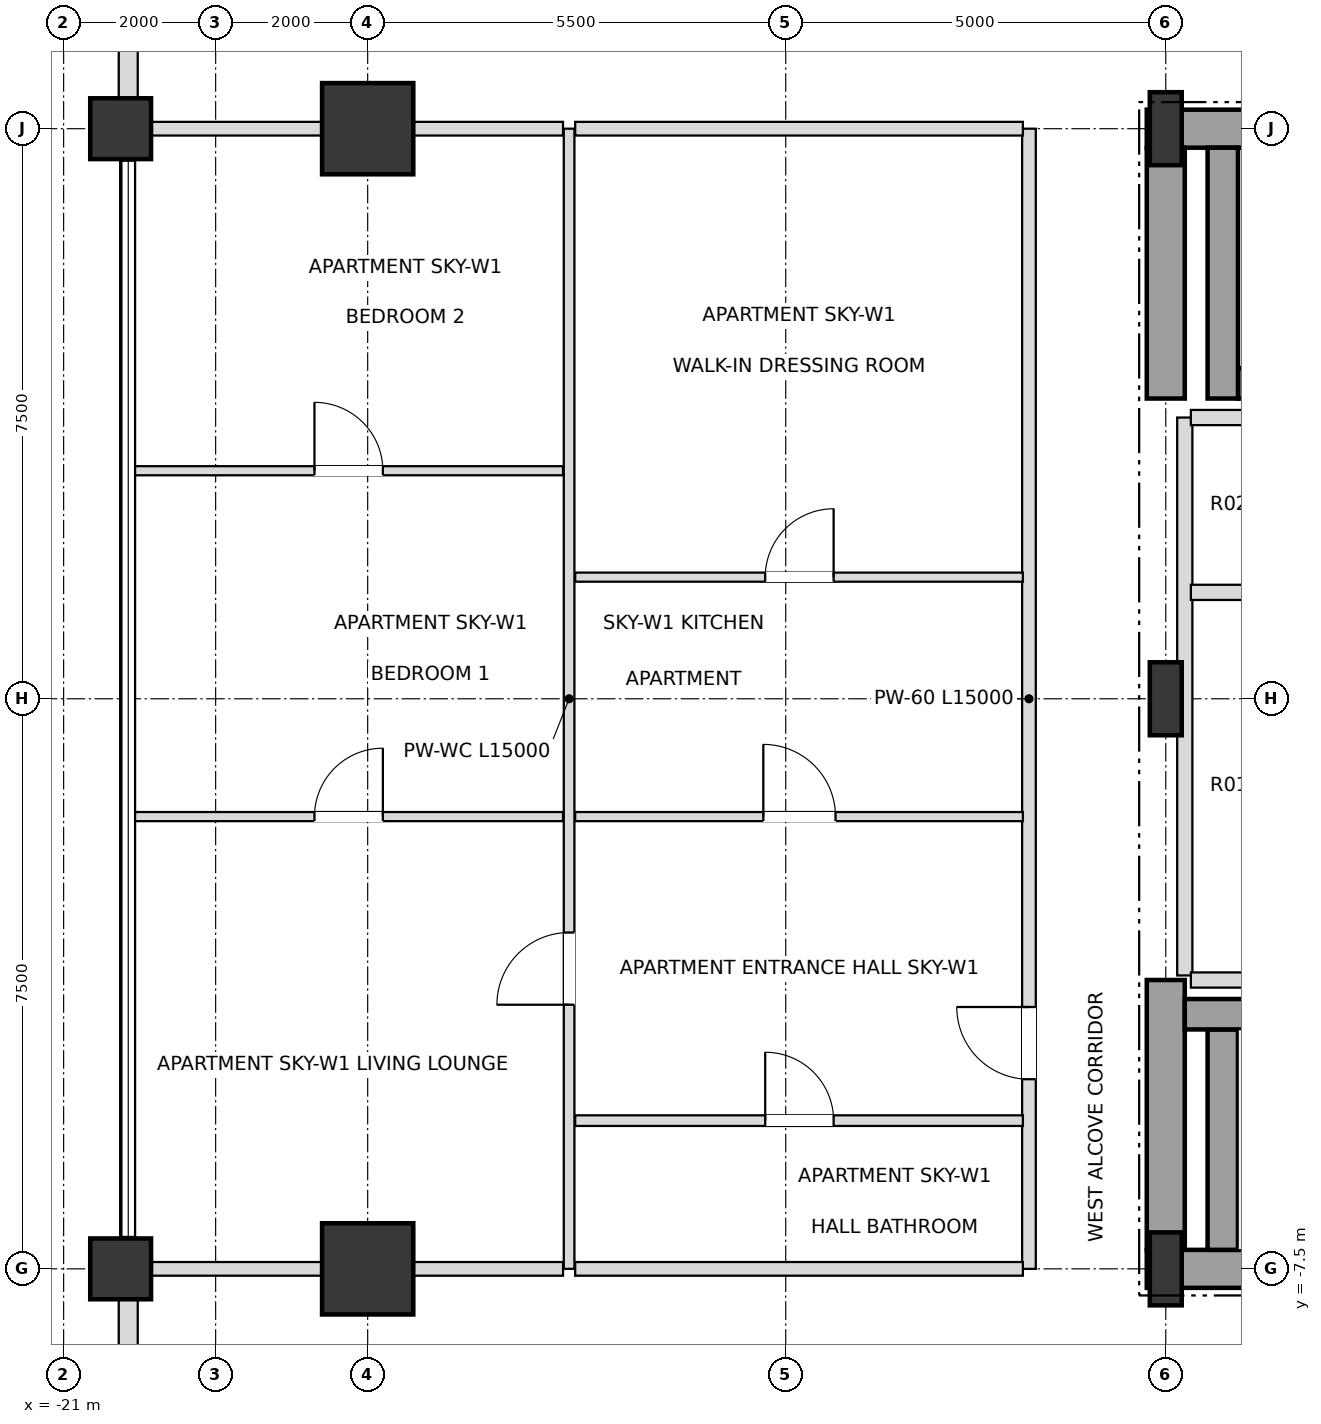
"""IFC4 building model, lengths in metres.
Left out: names, types, materials, properties, quantities, classifications, styles, units other than length and angle.
Written with IfcOpenShell. Run it as: python <this file> out.ifc"""

import sys

from ifc_helpers import new_model, si_unit, direction, frame, frame_2d, origin, origin_2d, place, context, subcontext, project, spatial, rectangle, i_section, extrude, element, fill, save


model = new_model("IFC4")
c1 = context("Model", 3, precision=1e-05, world=origin(), true_north=direction((0.0, 1.0)))
c2 = subcontext(c1, "Body", "Model", "MODEL_VIEW")
j1 = project(units=[si_unit("LENGTHUNIT", "METRE"), si_unit("PLANEANGLEUNIT", "RADIAN")], contexts=[c1])
p1 = place(None, origin())
s1 = spatial("IfcSite", under=j1, at=p1, CompositionType="ELEMENT")
p2 = place(p1, origin())
s2 = spatial("IfcBuilding", under=s1, at=p2, CompositionType="ELEMENT")
p3 = place(p2, frame((0.0, 0.0, 129.6)))
s3 = spatial("IfcBuildingStorey", under=s2, at=p3, CompositionType="ELEMENT", Elevation=129.6)
for number, where, z_axis, x_axis in (
    (1, (-6.5, -7.5, 0.0), (0.0, 0.0, 1.0), (1.0, 0.0, 0.0)),
    (2, (-6.5, 0.0, 0.0), (0.0, 0.0, 1.0), (1.0, 0.0, 0.0)),
    (3, (-6.5, 7.5, 0.0), (0.0, 0.0, 1.0), (1.0, 0.0, 0.0)),
):
    element("IfcColumn", number, at=place(p3, frame(where, z_axis=z_axis, x_axis=x_axis)), inside=s3, PredefinedType="COLUMN", context=c2, shape_type="SweptSolid", body=[
        extrude(i_section(OverallWidth=0.42, OverallDepth=0.96, WebThickness=0.022, FlangeThickness=0.034, at=origin_2d()), origin(), (0.0, 0.0, 1.0), 3.6),
    ])
for number, where, z_axis, x_axis in (
    (4, (-17.0, 7.5, 0.0), (0.0, 0.0, 1.0), (1.0, 0.0, 0.0)),
    (5, (-17.0, -7.5, 0.0), (0.0, 0.0, 1.0), (1.0, 0.0, 0.0)),
):
    element("IfcColumn", number, at=place(p3, frame(where, z_axis=z_axis, x_axis=x_axis)), inside=s3, PredefinedType="USERDEFINED", context=c2, shape_type="SweptSolid", body=[
        extrude(rectangle(XDim=1.2, YDim=1.2, at=origin_2d()), origin(), (0.0, 0.0, 1.0), 3.6),
    ])
for number, where, z_axis, x_axis in (
    (6, (-20.25, -7.5, 0.0), (0.0, 0.0, 1.0), (1.0, 0.0, 0.0)),
    (7, (-20.25, 7.5, 0.0), (0.0, 0.0, 1.0), (1.0, 0.0, 0.0)),
):
    element("IfcColumn", number, at=place(p3, frame(where, z_axis=z_axis, x_axis=x_axis)), inside=s3, PredefinedType="COLUMN", context=c2, shape_type="SweptSolid", body=[
        extrude(rectangle(XDim=0.8, YDim=0.8, at=origin_2d()), origin(), (0.0, 0.0, 1.0), 3.6),
    ])
p4 = place(p3, frame((-20.15, 12.605, 0.0), z_axis=(0.0, 0.0, 1.0), x_axis=(0.0, -1.0, 0.0)))
e8 = element("IfcWall", 8, at=p4, inside=s3, PredefinedType="SOLIDWALL", context=c2, shape_type="SweptSolid", body=[
    extrude(rectangle(XDim=4.71, YDim=0.25, at=frame_2d((2.355, 0.0))), origin(), (0.0, 0.0, 1.0), 2.736),
])
p5 = place(p4, frame((1.455, 0.0, 0.72)))
e9 = element("IfcOpeningElement", 9, at=p5, cuts=e8, PredefinedType="OPENING", context=c2, shape_type="SweptSolid", body=[
    extrude(rectangle(XDim=1.8, YDim=1.68, at=frame_2d((0.9, 0.84))), frame((0.0, 0.135, 0.0), z_axis=(0.0, -1.0, 0.0), x_axis=(1.0, 0.0, 0.0)), (0.0, 0.0, 1.0), 0.27),
])
p6 = place(p3, frame((-20.15, -7.895, 0.0), z_axis=(0.0, 0.0, 1.0), x_axis=(0.0, -1.0, 0.0)))
e10 = element("IfcWall", 10, at=p6, inside=s3, PredefinedType="SOLIDWALL", context=c2, shape_type="SweptSolid", body=[
    extrude(rectangle(XDim=4.71, YDim=0.25, at=frame_2d((2.355, 0.0))), origin(), (0.0, 0.0, 1.0), 2.736),
])
p7 = place(p6, frame((1.455, 0.0, 0.72)))
e11 = element("IfcOpeningElement", 11, at=p7, cuts=e10, PredefinedType="OPENING", context=c2, shape_type="SweptSolid", body=[
    extrude(rectangle(XDim=1.8, YDim=1.68, at=frame_2d((0.9, 0.84))), frame((0.0, 0.135, 0.0), z_axis=(0.0, -1.0, 0.0), x_axis=(1.0, 0.0, 0.0)), (0.0, 0.0, 1.0), 0.27),
])
p8 = place(p3, frame((-6.75, -7.5, 0.0), z_axis=(0.0, 0.0, 1.0), x_axis=(1.0, 0.0, 0.0)))
e12 = element("IfcWall", 12, at=p8, inside=s3, PredefinedType="SHEAR", context=c2, shape_type="SweptSolid", body=[
    extrude(rectangle(XDim=6.75, YDim=0.5, at=frame_2d((3.375, 0.0))), origin(), (0.0, 0.0, 1.0), 3.38),
])
p9 = place(p3, frame((-6.75, 7.5, 0.0), z_axis=(0.0, 0.0, 1.0), x_axis=(1.0, 0.0, 0.0)))
e13 = element("IfcWall", 13, at=p9, inside=s3, PredefinedType="SHEAR", context=c2, shape_type="SweptSolid", body=[
    extrude(rectangle(XDim=6.75, YDim=0.5, at=frame_2d((3.375, 0.0))), origin(), (0.0, 0.0, 1.0), 3.38),
])
p10 = place(p9, frame((1.65, 0.0, 0.0)))
e14 = element("IfcOpeningElement", 14, at=p10, cuts=e13, PredefinedType="OPENING", context=c2, shape_type="SweptSolid", body=[
    extrude(rectangle(XDim=1.05, YDim=2.15, at=frame_2d((0.525, 1.075))), frame((0.0, 0.26, 0.0), z_axis=(0.0, -1.0, 0.0), x_axis=(1.0, 0.0, 0.0)), (0.0, 0.0, 1.0), 0.52),
])
p11 = place(p3, frame((-6.5, -7.25, 0.0), z_axis=(0.0, 0.0, 1.0), x_axis=(0.0, 1.0, 0.0)))
e15 = element("IfcWall", 15, at=p11, inside=s3, PredefinedType="SHEAR", context=c2, shape_type="SweptSolid", body=[
    extrude(rectangle(XDim=3.55, YDim=0.5, at=frame_2d((1.775, 0.0))), origin(), (0.0, 0.0, 1.0), 3.38),
])
p12 = place(p3, frame((-6.5, 3.95, 0.0), z_axis=(0.0, 0.0, 1.0), x_axis=(0.0, 1.0, 0.0)))
e16 = element("IfcWall", 16, at=p12, inside=s3, PredefinedType="SHEAR", context=c2, shape_type="SweptSolid", body=[
    extrude(rectangle(XDim=3.3, YDim=0.5, at=frame_2d((1.65, 0.0))), origin(), (0.0, 0.0, 1.0), 3.38),
])
p13 = place(p3, frame((-5.75, -7.25, 0.0), z_axis=(0.0, 0.0, 1.0), x_axis=(0.0, 1.0, 0.0)))
e17 = element("IfcWall", 17, at=p13, inside=s3, PredefinedType="SHEAR", context=c2, shape_type="SweptSolid", body=[
    extrude(rectangle(XDim=2.9, YDim=0.4, at=frame_2d((1.45, 0.0))), origin(), (0.0, 0.0, 1.0), 3.38),
])
p14 = place(p3, frame((-6.25, -4.15, 0.0), z_axis=(0.0, 0.0, 1.0), x_axis=(1.0, 0.0, 0.0)))
e18 = element("IfcWall", 18, at=p14, inside=s3, PredefinedType="SHEAR", context=c2, shape_type="SweptSolid", body=[
    extrude(rectangle(XDim=7.78, YDim=0.4, at=frame_2d((3.89, 0.0))), origin(), (0.0, 0.0, 1.0), 3.38),
])
p15 = place(p3, frame((-5.55, 4.15, 0.0), z_axis=(0.0, 0.0, 1.0), x_axis=(1.0, 0.0, 0.0)))
e19 = element("IfcWall", 19, at=p15, inside=s3, PredefinedType="SHEAR", context=c2, shape_type="SweptSolid", body=[
    extrude(rectangle(XDim=7.08, YDim=0.4, at=frame_2d((3.54, 0.0))), origin(), (0.0, 0.0, 1.0), 3.38),
])
p16 = place(p3, frame((-5.75, 3.95, 0.0), z_axis=(0.0, 0.0, 1.0), x_axis=(0.0, 1.0, 0.0)))
e20 = element("IfcWall", 20, at=p16, inside=s3, PredefinedType="SHEAR", context=c2, shape_type="SweptSolid", body=[
    extrude(rectangle(XDim=3.3, YDim=0.4, at=frame_2d((1.65, 0.0))), origin(), (0.0, 0.0, 1.0), 3.38),
])
p17 = place(p3, frame((-14.35, -7.5, 0.0), z_axis=(0.0, 0.0, 1.0), x_axis=(0.0, 1.0, 0.0)))
e21 = element("IfcWall", 21, at=p17, inside=s3, PredefinedType="PARTITIONING", context=c2, shape_type="SweptSolid", body=[
    extrude(rectangle(XDim=15.0, YDim=0.14, at=frame_2d((7.5, 0.0))), origin(), (0.0, 0.0, 1.0), 3.38),
])
p18 = place(p17, frame((3.475, 0.0, 0.0)))
e22 = element("IfcOpeningElement", 22, at=p18, cuts=e21, PredefinedType="OPENING", context=c2, shape_type="SweptSolid", body=[
    extrude(rectangle(XDim=0.95, YDim=2.1, at=frame_2d((0.475, 1.05))), frame((0.0, 0.08, 0.0), z_axis=(0.0, -1.0, 0.0), x_axis=(1.0, 0.0, 0.0)), (0.0, 0.0, 1.0), 0.16),
])
p19 = place(p3, frame((-8.3, -7.5, 0.0), z_axis=(0.0, 0.0, 1.0), x_axis=(0.0, 1.0, 0.0)))
e23 = element("IfcWall", 23, at=p19, inside=s3, PredefinedType="PARTITIONING", context=c2, shape_type="SweptSolid", body=[
    extrude(rectangle(XDim=15.0, YDim=0.18, at=frame_2d((7.5, 0.0))), origin(), (0.0, 0.0, 1.0), 3.38),
])
p20 = place(p19, frame((2.495, 0.0, 0.0)))
e24 = element("IfcOpeningElement", 24, at=p20, cuts=e23, PredefinedType="OPENING", context=c2, shape_type="SweptSolid", body=[
    extrude(rectangle(XDim=0.95, YDim=2.15, at=frame_2d((0.475, 1.075))), frame((0.0, 0.1, 0.0), z_axis=(0.0, -1.0, 0.0), x_axis=(1.0, 0.0, 0.0)), (0.0, 0.0, 1.0), 0.2),
])
p21 = place(p3, frame((-6.25, -3.64, 0.0), z_axis=(0.0, 0.0, 1.0), x_axis=(0.0, 1.0, 0.0)))
e25 = element("IfcWall", 25, at=p21, inside=s3, PredefinedType="SOLIDWALL", context=c2, shape_type="SweptSolid", body=[
    extrude(rectangle(XDim=7.34, YDim=0.2, at=frame_2d((3.67, 0.0))), origin(), (0.0, 0.0, 1.0), 3.38),
])
p22 = place(p3, frame((-20.15, -7.5, 0.0), z_axis=(0.0, 0.0, 1.0), x_axis=(1.0, 0.0, 0.0)))
e26 = element("IfcWall", 26, at=p22, inside=s3, PredefinedType="PARTITIONING", context=c2, shape_type="SweptSolid", body=[
    extrude(rectangle(XDim=5.72, YDim=0.18, at=frame_2d((2.86, 0.0))), origin(), (0.0, 0.0, 1.0), 2.816),
])
p23 = place(p3, frame((-14.27, -7.5, 0.0), z_axis=(0.0, 0.0, 1.0), x_axis=(1.0, 0.0, 0.0)))
e27 = element("IfcWall", 27, at=p23, inside=s3, PredefinedType="PARTITIONING", context=c2, shape_type="SweptSolid", body=[
    extrude(rectangle(XDim=5.89, YDim=0.18, at=frame_2d((2.945, 0.0))), origin(), (0.0, 0.0, 1.0), 2.816),
])
p24 = place(p3, frame((-14.27, -5.55, 0.0), z_axis=(0.0, 0.0, 1.0), x_axis=(1.0, 0.0, 0.0)))
e28 = element("IfcWall", 28, at=p24, inside=s3, PredefinedType="PARTITIONING", context=c2, shape_type="SweptSolid", body=[
    extrude(rectangle(XDim=5.89, YDim=0.14, at=frame_2d((2.945, 0.0))), origin(), (0.0, 0.0, 1.0), 3.38),
])
p25 = place(p24, frame((2.5, 0.0, 0.0)))
e29 = element("IfcOpeningElement", 29, at=p25, cuts=e28, PredefinedType="OPENING", context=c2, shape_type="SweptSolid", body=[
    extrude(rectangle(XDim=0.9, YDim=2.1, at=frame_2d((0.45, 1.05))), frame((0.0, 0.08, 0.0), z_axis=(0.0, -1.0, 0.0), x_axis=(1.0, 0.0, 0.0)), (0.0, 0.0, 1.0), 0.16),
])
p26 = place(p3, frame((-6.17, -3.7, 0.0), z_axis=(0.0, 0.0, 1.0), x_axis=(1.0, 0.0, 0.0)))
e30 = element("IfcWall", 30, at=p26, inside=s3, PredefinedType="SOLIDWALL", context=c2, shape_type="SweptSolid", body=[
    extrude(rectangle(XDim=1.94, YDim=0.2, at=frame_2d((0.97, 0.0))), origin(), (0.0, 0.0, 1.0), 3.38),
])
p27 = place(p3, frame((-20.07, -1.55, 0.0), z_axis=(0.0, 0.0, 1.0), x_axis=(1.0, 0.0, 0.0)))
e31 = element("IfcWall", 31, at=p27, inside=s3, PredefinedType="PARTITIONING", context=c2, shape_type="SweptSolid", body=[
    extrude(rectangle(XDim=5.64, YDim=0.12, at=frame_2d((2.82, 0.0))), origin(), (0.0, 0.0, 1.0), 2.816),
])
p28 = place(p27, frame((2.37, 0.0, 0.0)))
e32 = element("IfcOpeningElement", 32, at=p28, cuts=e31, PredefinedType="OPENING", context=c2, shape_type="SweptSolid", body=[
    extrude(rectangle(XDim=0.9, YDim=2.1, at=frame_2d((0.45, 1.05))), frame((0.0, 0.07, 0.0), z_axis=(0.0, -1.0, 0.0), x_axis=(1.0, 0.0, 0.0)), (0.0, 0.0, 1.0), 0.14),
])
p29 = place(p3, frame((-14.27, -1.55, 0.0), z_axis=(0.0, 0.0, 1.0), x_axis=(1.0, 0.0, 0.0)))
e33 = element("IfcWall", 33, at=p29, inside=s3, PredefinedType="PARTITIONING", context=c2, shape_type="SweptSolid", body=[
    extrude(rectangle(XDim=5.89, YDim=0.12, at=frame_2d((2.945, 0.0))), origin(), (0.0, 0.0, 1.0), 3.38),
])
p30 = place(p29, frame((2.475, 0.0, 0.0)))
e34 = element("IfcOpeningElement", 34, at=p30, cuts=e33, PredefinedType="OPENING", context=c2, shape_type="SweptSolid", body=[
    extrude(rectangle(XDim=0.95, YDim=2.1, at=frame_2d((0.475, 1.05))), frame((0.0, 0.07, 0.0), z_axis=(0.0, -1.0, 0.0), x_axis=(1.0, 0.0, 0.0)), (0.0, 0.0, 1.0), 0.14),
])
p31 = place(p3, frame((-6.17, 1.4, 0.0), z_axis=(0.0, 0.0, 1.0), x_axis=(1.0, 0.0, 0.0)))
e35 = element("IfcWall", 35, at=p31, inside=s3, PredefinedType="SOLIDWALL", context=c2, shape_type="SweptSolid", body=[
    extrude(rectangle(XDim=1.94, YDim=0.2, at=frame_2d((0.97, 0.0))), origin(), (0.0, 0.0, 1.0), 3.38),
])
p32 = place(p3, frame((-14.27, 1.6, 0.0), z_axis=(0.0, 0.0, 1.0), x_axis=(1.0, 0.0, 0.0)))
e36 = element("IfcWall", 36, at=p32, inside=s3, PredefinedType="PARTITIONING", context=c2, shape_type="SweptSolid", body=[
    extrude(rectangle(XDim=5.89, YDim=0.12, at=frame_2d((2.945, 0.0))), origin(), (0.0, 0.0, 1.0), 3.38),
])
p33 = place(p32, frame((2.5, 0.0, 0.0)))
e37 = element("IfcOpeningElement", 37, at=p33, cuts=e36, PredefinedType="OPENING", context=c2, shape_type="SweptSolid", body=[
    extrude(rectangle(XDim=0.9, YDim=2.1, at=frame_2d((0.45, 1.05))), frame((0.0, 0.07, 0.0), z_axis=(0.0, -1.0, 0.0), x_axis=(1.0, 0.0, 0.0)), (0.0, 0.0, 1.0), 0.14),
])
p34 = place(p3, frame((-20.07, 3.0, 0.0), z_axis=(0.0, 0.0, 1.0), x_axis=(1.0, 0.0, 0.0)))
e38 = element("IfcWall", 38, at=p34, inside=s3, PredefinedType="PARTITIONING", context=c2, shape_type="SweptSolid", body=[
    extrude(rectangle(XDim=5.64, YDim=0.12, at=frame_2d((2.82, 0.0))), origin(), (0.0, 0.0, 1.0), 2.816),
])
p35 = place(p34, frame((2.37, 0.0, 0.0)))
e39 = element("IfcOpeningElement", 39, at=p35, cuts=e38, PredefinedType="OPENING", context=c2, shape_type="SweptSolid", body=[
    extrude(rectangle(XDim=0.9, YDim=2.1, at=frame_2d((0.45, 1.05))), frame((0.0, 0.07, 0.0), z_axis=(0.0, -1.0, 0.0), x_axis=(1.0, 0.0, 0.0)), (0.0, 0.0, 1.0), 0.14),
])
p36 = place(p3, frame((-6.17, 3.7, 0.0), z_axis=(0.0, 0.0, 1.0), x_axis=(1.0, 0.0, 0.0)))
e40 = element("IfcWall", 40, at=p36, inside=s3, PredefinedType="SOLIDWALL", context=c2, shape_type="SweptSolid", body=[
    extrude(rectangle(XDim=1.94, YDim=0.2, at=frame_2d((0.97, 0.0))), origin(), (0.0, 0.0, 1.0), 3.38),
])
p37 = place(p3, frame((-20.15, 7.5, 0.0), z_axis=(0.0, 0.0, 1.0), x_axis=(1.0, 0.0, 0.0)))
e41 = element("IfcWall", 41, at=p37, inside=s3, PredefinedType="PARTITIONING", context=c2, shape_type="SweptSolid", body=[
    extrude(rectangle(XDim=5.72, YDim=0.18, at=frame_2d((2.86, 0.0))), origin(), (0.0, 0.0, 1.0), 2.816),
])
p38 = place(p3, frame((-14.27, 7.5, 0.0), z_axis=(0.0, 0.0, 1.0), x_axis=(1.0, 0.0, 0.0)))
e42 = element("IfcWall", 42, at=p38, inside=s3, PredefinedType="PARTITIONING", context=c2, shape_type="SweptSolid", body=[
    extrude(rectangle(XDim=5.89, YDim=0.18, at=frame_2d((2.945, 0.0))), origin(), (0.0, 0.0, 1.0), 2.816),
])
p39 = place(p25, origin())
e43 = element("IfcDoor", 43, at=p39, inside=s3, OperationType="SINGLE_SWING_LEFT", PredefinedType="DOOR", context=c2, shape_type="SweptSolid", body=[
    extrude(rectangle(XDim=0.9, YDim=2.1, at=frame_2d((0.45, 1.05))), frame((0.0, 0.025, 0.0), z_axis=(0.0, -1.0, 0.0), x_axis=(1.0, 0.0, 0.0)), (0.0, 0.0, 1.0), 0.05),
])
fill(e29, e43)
p40 = place(p20, origin())
e44 = element("IfcDoor", 44, at=p40, inside=s3, OperationType="SINGLE_SWING_RIGHT", PredefinedType="DOOR", context=c2, shape_type="SweptSolid", body=[
    extrude(rectangle(XDim=0.95, YDim=2.15, at=frame_2d((0.475, 1.075))), frame((0.0, 0.025, 0.0), z_axis=(0.0, -1.0, 0.0), x_axis=(1.0, 0.0, 0.0)), (0.0, 0.0, 1.0), 0.05),
])
fill(e24, e44)
p41 = place(p30, origin())
e45 = element("IfcDoor", 45, at=p41, inside=s3, OperationType="SINGLE_SWING_LEFT", PredefinedType="DOOR", context=c2, shape_type="SweptSolid", body=[
    extrude(rectangle(XDim=0.95, YDim=2.1, at=frame_2d((0.475, 1.05))), frame((0.0, 0.025, 0.0), z_axis=(0.0, -1.0, 0.0), x_axis=(1.0, 0.0, 0.0)), (0.0, 0.0, 1.0), 0.05),
])
fill(e34, e45)
p42 = place(p33, origin())
e46 = element("IfcDoor", 46, at=p42, inside=s3, OperationType="SINGLE_SWING_RIGHT", PredefinedType="DOOR", context=c2, shape_type="SweptSolid", body=[
    extrude(rectangle(XDim=0.9, YDim=2.1, at=frame_2d((0.45, 1.05))), frame((0.0, 0.025, 0.0), z_axis=(0.0, -1.0, 0.0), x_axis=(1.0, 0.0, 0.0)), (0.0, 0.0, 1.0), 0.05),
])
fill(e37, e46)
p43 = place(p18, origin())
e47 = element("IfcDoor", 47, at=p43, inside=s3, OperationType="SINGLE_SWING_LEFT", PredefinedType="DOOR", context=c2, shape_type="SweptSolid", body=[
    extrude(rectangle(XDim=0.95, YDim=2.1, at=frame_2d((0.475, 1.05))), frame((0.0, 0.025, 0.0), z_axis=(0.0, -1.0, 0.0), x_axis=(1.0, 0.0, 0.0)), (0.0, 0.0, 1.0), 0.05),
])
fill(e22, e47)
p44 = place(p28, origin())
e48 = element("IfcDoor", 48, at=p44, inside=s3, OperationType="SINGLE_SWING_RIGHT", PredefinedType="DOOR", context=c2, shape_type="SweptSolid", body=[
    extrude(rectangle(XDim=0.9, YDim=2.1, at=frame_2d((0.45, 1.05))), frame((0.0, 0.025, 0.0), z_axis=(0.0, -1.0, 0.0), x_axis=(1.0, 0.0, 0.0)), (0.0, 0.0, 1.0), 0.05),
])
fill(e32, e48)
p45 = place(p35, origin())
e49 = element("IfcDoor", 49, at=p45, inside=s3, OperationType="SINGLE_SWING_LEFT", PredefinedType="DOOR", context=c2, shape_type="SweptSolid", body=[
    extrude(rectangle(XDim=0.9, YDim=2.1, at=frame_2d((0.45, 1.05))), frame((0.0, 0.025, 0.0), z_axis=(0.0, -1.0, 0.0), x_axis=(1.0, 0.0, 0.0)), (0.0, 0.0, 1.0), 0.05),
])
fill(e39, e49)
save(model, sys.argv[1])
